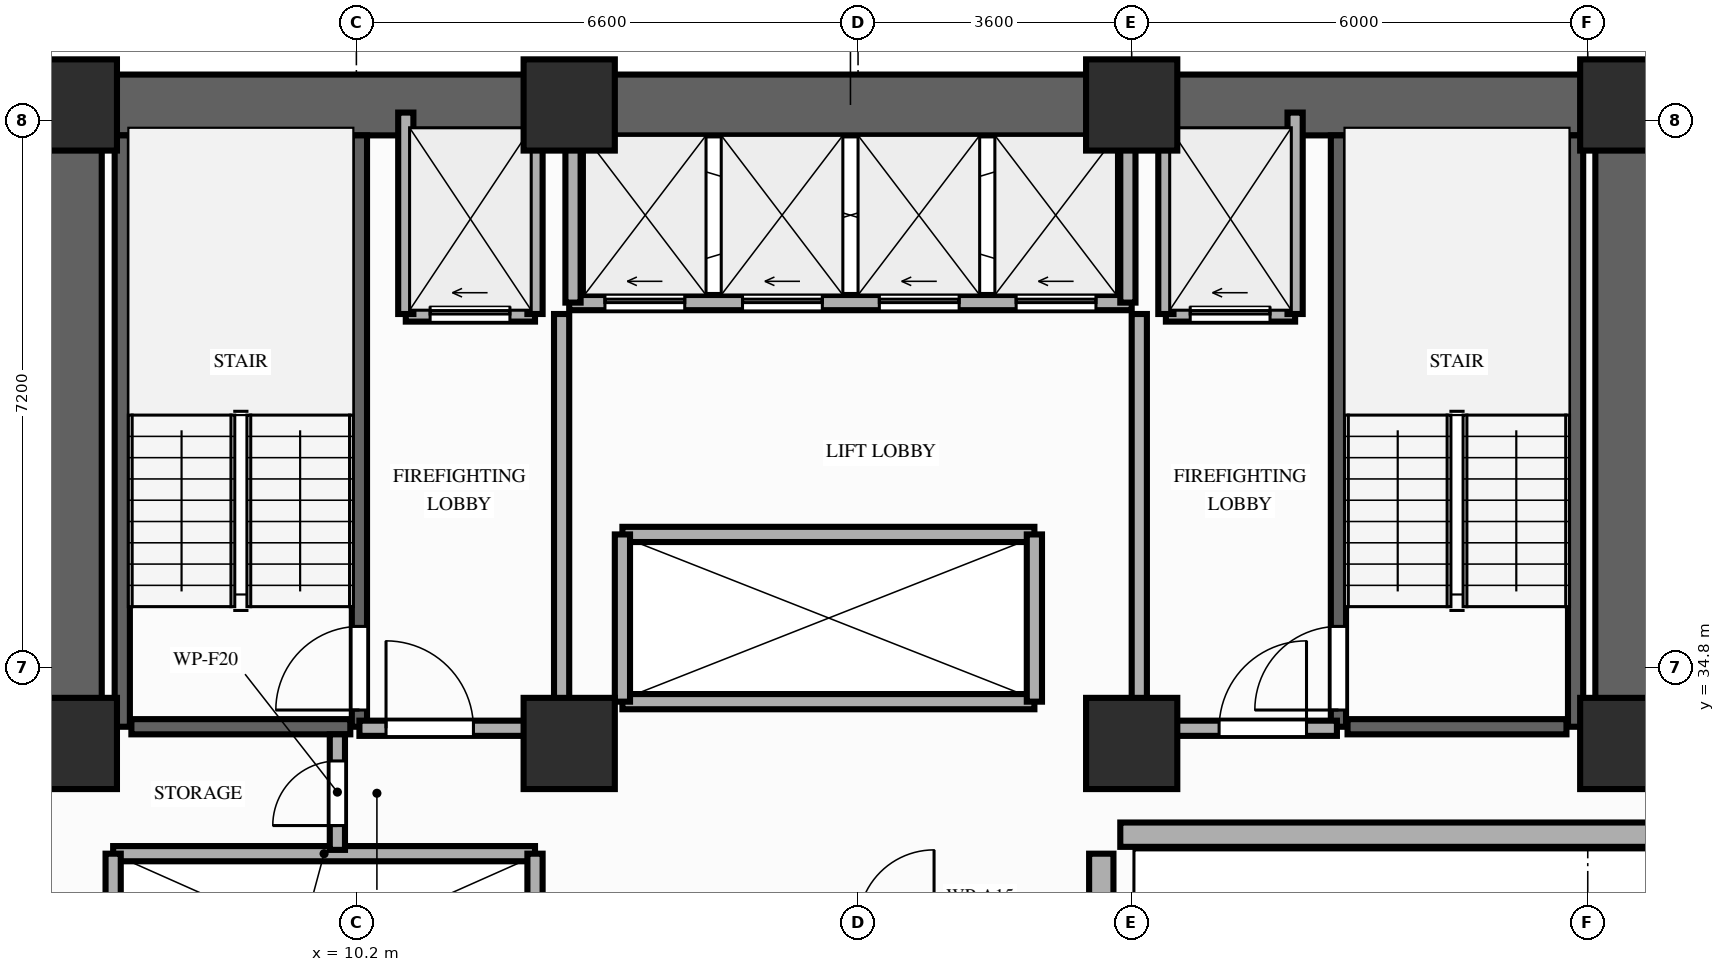
"""IFC4 building model, lengths in metres.
Left out: names, types, materials, properties, quantities, classifications, styles, units other than length and angle.
Written with IfcOpenShell. Run it as: python <this file> out.ifc"""

import sys

from ifc_helpers import new_model, si_unit, direction, frame, frame_2d, origin, origin_2d, place, context, subcontext, project, spatial, rectangle, extrude, element, fill, save


model = new_model("IFC4")
c1 = context("Model", 3, precision=1e-05, world=origin(), true_north=direction((0.0, 1.0)))
c2 = subcontext(c1, "Body", "Model", "MODEL_VIEW")
j1 = project(units=[si_unit("LENGTHUNIT", "METRE"), si_unit("PLANEANGLEUNIT", "RADIAN")], contexts=[c1])
p1 = place(None, origin())
s1 = spatial("IfcSite", under=j1, at=p1, CompositionType="ELEMENT")
p2 = place(p1, origin())
s2 = spatial("IfcBuilding", under=s1, at=p2, CompositionType="ELEMENT")
p3 = place(p2, frame((0.0, 0.0, 36.6)))
s3 = spatial("IfcBuildingStorey", under=s2, at=p3, CompositionType="ELEMENT", Elevation=36.6)
for number, where, z_axis, x_axis in (
    (1, (6.45, 33.8, 0.0), (0.0, 0.0, 1.0), (1.0, 0.0, 0.0)),
    (2, (13.0, 33.8, 0.0), (0.0, 0.0, 1.0), (1.0, 0.0, 0.0)),
    (3, (20.4, 33.8, 0.0), (0.0, 0.0, 1.0), (1.0, 0.0, 0.0)),
    (4, (26.9, 33.8, 0.0), (0.0, 0.0, 1.0), (1.0, 0.0, 0.0)),
    (5, (6.45, 42.2, 0.0), (0.0, 0.0, 1.0), (1.0, 0.0, 0.0)),
    (6, (13.0, 42.2, 0.0), (0.0, 0.0, 1.0), (1.0, 0.0, 0.0)),
    (7, (20.4, 42.2, 0.0), (0.0, 0.0, 1.0), (1.0, 0.0, 0.0)),
    (8, (26.9, 42.2, 0.0), (0.0, 0.0, 1.0), (1.0, 0.0, 0.0)),
):
    element("IfcColumn", number, at=place(p3, frame(where, z_axis=z_axis, x_axis=x_axis)), inside=s3, PredefinedType="COLUMN", context=c2, shape_type="SweptSolid", body=[
        extrude(rectangle(XDim=1.2, YDim=1.2, at=origin_2d()), origin(), (0.0, 0.0, 1.0), 3.2),
    ])
p4 = place(p3, frame((20.0, 8.8, 0.0), z_axis=(0.0, 0.0, 1.0), x_axis=(0.0, 1.0, 0.0)))
e9 = element("IfcWall", 9, at=p4, inside=s3, PredefinedType="STANDARD", context=c2, shape_type="SweptSolid", body=[
    extrude(rectangle(XDim=23.55, YDim=0.32, at=frame_2d((11.775, 0.0))), origin(), (0.0, 0.0, 1.0), 2.35),
])
p5 = place(p4, frame((10.7, 0.0, 0.85)))
e10 = element("IfcOpeningElement", 10, at=p5, cuts=e9, PredefinedType="OPENING", context=c2, shape_type="SweptSolid", body=[
    extrude(rectangle(XDim=2.4, YDim=1.25, at=frame_2d((1.2, 0.625))), frame((0.0, 0.17, 0.0), z_axis=(0.0, -1.0, 0.0), x_axis=(1.0, 0.0, 0.0)), (0.0, 0.0, 1.0), 0.34),
])
p6 = place(p3, frame((20.25, 32.6, 0.0), z_axis=(0.0, 0.0, 1.0), x_axis=(1.0, 0.0, 0.0)))
e11 = element("IfcWall", 11, at=p6, inside=s3, PredefinedType="STANDARD", context=c2, shape_type="SweptSolid", body=[
    extrude(rectangle(XDim=7.35, YDim=0.32, at=frame_2d((3.675, 0.0))), origin(), (0.0, 0.0, 1.0), 2.35),
])
p7 = place(p3, frame((6.45, 42.2, 0.0), z_axis=(0.0, 0.0, 1.0), x_axis=(1.0, 0.0, 0.0)))
e12 = element("IfcWall", 12, at=p7, inside=s3, PredefinedType="SHEAR", context=c2, shape_type="SweptSolid", body=[
    extrude(rectangle(XDim=20.45, YDim=0.8, at=frame_2d((10.225, 0.0))), origin(), (0.0, 0.0, 1.0), 2.96),
])
for number, where, z_axis, x_axis in (
    (13, (6.45, 33.8, 0.0), (0.0, 0.0, 1.0), (0.0, 1.0, 0.0)),
    (14, (26.9, 33.8, 0.0), (0.0, 0.0, 1.0), (0.0, 1.0, 0.0)),
):
    element("IfcWall", number, at=place(p3, frame(where, z_axis=z_axis, x_axis=x_axis)), inside=s3, PredefinedType="SHEAR", context=c2, shape_type="SweptSolid", body=[
        extrude(rectangle(XDim=7.95, YDim=0.8, at=frame_2d((3.975, 0.0))), origin(), (0.0, 0.0, 1.0), 2.96),
    ])
p8 = place(p3, frame((7.12, 34.02, 0.0), z_axis=(0.0, 0.0, 1.0), x_axis=(0.0, 1.0, 0.0)))
e15 = element("IfcWall", 15, at=p8, inside=s3, PredefinedType="SHEAR", context=c2, shape_type="SweptSolid", body=[
    extrude(rectangle(XDim=7.78, YDim=0.2, at=frame_2d((3.89, 0.0))), origin(), (0.0, 0.0, 1.0), 2.96),
])
p9 = place(p3, frame((10.24, 34.02, 0.0), z_axis=(0.0, 0.0, 1.0), x_axis=(0.0, 1.0, 0.0)))
e16 = element("IfcWall", 16, at=p9, inside=s3, PredefinedType="SHEAR", context=c2, shape_type="SweptSolid", body=[
    extrude(rectangle(XDim=7.78, YDim=0.2, at=frame_2d((3.89, 0.0))), origin(), (0.0, 0.0, 1.0), 2.96),
])
p10 = place(p9, frame((0.22, 0.0, 0.0)))
e17 = element("IfcOpeningElement", 17, at=p10, cuts=e16, PredefinedType="OPENING", context=c2, shape_type="SweptSolid", body=[
    extrude(rectangle(XDim=1.1, YDim=2.15, at=frame_2d((0.55, 1.075))), frame((0.0, 0.11, 0.0), z_axis=(0.0, -1.0, 0.0), x_axis=(1.0, 0.0, 0.0)), (0.0, 0.0, 1.0), 0.22),
])
p11 = place(p3, frame((7.24, 34.02, 0.0), z_axis=(0.0, 0.0, 1.0), x_axis=(1.0, 0.0, 0.0)))
e18 = element("IfcWall", 18, at=p11, inside=s3, PredefinedType="SHEAR", context=c2, shape_type="SweptSolid", body=[
    extrude(rectangle(XDim=2.88, YDim=0.2, at=frame_2d((1.44, 0.0))), origin(), (0.0, 0.0, 1.0), 2.96),
])
p12 = place(p3, frame((23.12, 34.02, 0.0), z_axis=(0.0, 0.0, 1.0), x_axis=(0.0, 1.0, 0.0)))
e19 = element("IfcWall", 19, at=p12, inside=s3, PredefinedType="SHEAR", context=c2, shape_type="SweptSolid", body=[
    extrude(rectangle(XDim=7.78, YDim=0.2, at=frame_2d((3.89, 0.0))), origin(), (0.0, 0.0, 1.0), 2.96),
])
p13 = place(p12, frame((0.22, 0.0, 0.0)))
e20 = element("IfcOpeningElement", 20, at=p13, cuts=e19, PredefinedType="OPENING", context=c2, shape_type="SweptSolid", body=[
    extrude(rectangle(XDim=1.1, YDim=2.15, at=frame_2d((0.55, 1.075))), frame((0.0, 0.11, 0.0), z_axis=(0.0, -1.0, 0.0), x_axis=(1.0, 0.0, 0.0)), (0.0, 0.0, 1.0), 0.22),
])
p14 = place(p3, frame((26.24, 34.02, 0.0), z_axis=(0.0, 0.0, 1.0), x_axis=(0.0, 1.0, 0.0)))
e21 = element("IfcWall", 21, at=p14, inside=s3, PredefinedType="SHEAR", context=c2, shape_type="SweptSolid", body=[
    extrude(rectangle(XDim=7.78, YDim=0.2, at=frame_2d((3.89, 0.0))), origin(), (0.0, 0.0, 1.0), 2.96),
])
p15 = place(p3, frame((23.24, 34.02, 0.0), z_axis=(0.0, 0.0, 1.0), x_axis=(1.0, 0.0, 0.0)))
e22 = element("IfcWall", 22, at=p15, inside=s3, PredefinedType="SHEAR", context=c2, shape_type="SweptSolid", body=[
    extrude(rectangle(XDim=2.88, YDim=0.2, at=frame_2d((1.44, 0.0))), origin(), (0.0, 0.0, 1.0), 2.96),
])
p16 = place(p3, frame((7.0, 32.35, 0.0), z_axis=(0.0, 0.0, 1.0), x_axis=(1.0, 0.0, 0.0)))
e23 = element("IfcWall", 23, at=p16, inside=s3, PredefinedType="MOVABLE", context=c2, shape_type="SweptSolid", body=[
    extrude(rectangle(XDim=5.55, YDim=0.2, at=frame_2d((2.775, 0.0))), origin(), (0.0, 0.0, 1.0), 2.96),
])
for number, where, z_axis, x_axis in (
    (24, (7.0, 29.85, 0.0), (0.0, 0.0, 1.0), (0.0, 1.0, 0.0)),
    (25, (12.55, 29.85, 0.0), (0.0, 0.0, 1.0), (0.0, 1.0, 0.0)),
):
    element("IfcWall", number, at=place(p3, frame(where, z_axis=z_axis, x_axis=x_axis)), inside=s3, PredefinedType="MOVABLE", context=c2, shape_type="SweptSolid", body=[
        extrude(rectangle(XDim=2.5, YDim=0.2, at=frame_2d((1.25, 0.0))), origin(), (0.0, 0.0, 1.0), 2.96),
    ])
p17 = place(p3, frame((10.85, 39.45, 0.0), z_axis=(0.0, 0.0, 1.0), x_axis=(1.0, 0.0, 0.0)))
e26 = element("IfcWall", 26, at=p17, inside=s3, PredefinedType="MOVABLE", context=c2, shape_type="SweptSolid", body=[
    extrude(rectangle(XDim=1.7, YDim=0.2, at=frame_2d((0.85, 0.0))), origin(), (0.0, 0.0, 1.0), 2.96),
])
p18 = place(p17, frame((0.32, 0.0, 0.0)))
e27 = element("IfcOpeningElement", 27, at=p18, cuts=e26, PredefinedType="OPENING", context=c2, shape_type="SweptSolid", body=[
    extrude(rectangle(XDim=1.05, YDim=2.15, at=frame_2d((0.525, 1.075))), frame((0.0, 0.11, 0.0), z_axis=(0.0, -1.0, 0.0), x_axis=(1.0, 0.0, 0.0)), (0.0, 0.0, 1.0), 0.22),
])
p19 = place(p3, frame((20.85, 39.45, 0.0), z_axis=(0.0, 0.0, 1.0), x_axis=(1.0, 0.0, 0.0)))
e28 = element("IfcWall", 28, at=p19, inside=s3, PredefinedType="MOVABLE", context=c2, shape_type="SweptSolid", body=[
    extrude(rectangle(XDim=1.7, YDim=0.2, at=frame_2d((0.85, 0.0))), origin(), (0.0, 0.0, 1.0), 2.96),
])
p20 = place(p19, frame((0.32, 0.0, 0.0)))
e29 = element("IfcOpeningElement", 29, at=p20, cuts=e28, PredefinedType="OPENING", context=c2, shape_type="SweptSolid", body=[
    extrude(rectangle(XDim=1.05, YDim=2.15, at=frame_2d((0.525, 1.075))), frame((0.0, 0.11, 0.0), z_axis=(0.0, -1.0, 0.0), x_axis=(1.0, 0.0, 0.0)), (0.0, 0.0, 1.0), 0.22),
])
for number, where, z_axis, x_axis in (
    (30, (10.85, 39.45, 0.0), (0.0, 0.0, 1.0), (0.0, 1.0, 0.0)),
    (31, (12.55, 39.45, 0.0), (0.0, 0.0, 1.0), (0.0, 1.0, 0.0)),
):
    element("IfcWall", number, at=place(p3, frame(where, z_axis=z_axis, x_axis=x_axis)), inside=s3, PredefinedType="MOVABLE", context=c2, shape_type="SweptSolid", body=[
        extrude(rectangle(XDim=2.65, YDim=0.2, at=frame_2d((1.325, 0.0))), origin(), (0.0, 0.0, 1.0), 2.35),
    ])
p21 = place(p3, frame((12.9, 34.0, 0.0), z_axis=(0.0, 0.0, 1.0), x_axis=(0.0, 1.0, 0.0)))
e32 = element("IfcWall", 32, at=p21, inside=s3, PredefinedType="PARTITIONING", context=c2, shape_type="SweptSolid", body=[
    extrude(rectangle(XDim=5.45, YDim=0.2, at=frame_2d((2.725, 0.0))), origin(), (0.0, 0.0, 1.0), 2.35),
])
p22 = place(p3, frame((10.24, 34.0, 0.0), z_axis=(0.0, 0.0, 1.0), x_axis=(1.0, 0.0, 0.0)))
e33 = element("IfcWall", 33, at=p22, inside=s3, PredefinedType="PARTITIONING", context=c2, shape_type="SweptSolid", body=[
    extrude(rectangle(XDim=2.66, YDim=0.2, at=frame_2d((1.33, 0.0))), origin(), (0.0, 0.0, 1.0), 2.35),
])
p23 = place(p22, frame((0.35, 0.0, 0.0)))
e34 = element("IfcOpeningElement", 34, at=p23, cuts=e33, PredefinedType="OPENING", context=c2, shape_type="SweptSolid", body=[
    extrude(rectangle(XDim=1.15, YDim=2.15, at=frame_2d((0.575, 1.075))), frame((0.0, 0.11, 0.0), z_axis=(0.0, -1.0, 0.0), x_axis=(1.0, 0.0, 0.0)), (0.0, 0.0, 1.0), 0.22),
])
for number, where, z_axis, x_axis in (
    (35, (20.85, 39.45, 0.0), (0.0, 0.0, 1.0), (0.0, 1.0, 0.0)),
    (36, (22.55, 39.45, 0.0), (0.0, 0.0, 1.0), (0.0, 1.0, 0.0)),
):
    element("IfcWall", number, at=place(p3, frame(where, z_axis=z_axis, x_axis=x_axis)), inside=s3, PredefinedType="MOVABLE", context=c2, shape_type="SweptSolid", body=[
        extrude(rectangle(XDim=2.65, YDim=0.2, at=frame_2d((1.325, 0.0))), origin(), (0.0, 0.0, 1.0), 2.35),
    ])
p24 = place(p3, frame((20.5, 34.0, 0.0), z_axis=(0.0, 0.0, 1.0), x_axis=(0.0, 1.0, 0.0)))
e37 = element("IfcWall", 37, at=p24, inside=s3, PredefinedType="PARTITIONING", context=c2, shape_type="SweptSolid", body=[
    extrude(rectangle(XDim=5.45, YDim=0.2, at=frame_2d((2.725, 0.0))), origin(), (0.0, 0.0, 1.0), 2.35),
])
p25 = place(p3, frame((20.5, 34.0, 0.0), z_axis=(0.0, 0.0, 1.0), x_axis=(1.0, 0.0, 0.0)))
e38 = element("IfcWall", 38, at=p25, inside=s3, PredefinedType="PARTITIONING", context=c2, shape_type="SweptSolid", body=[
    extrude(rectangle(XDim=2.6, YDim=0.2, at=frame_2d((1.3, 0.0))), origin(), (0.0, 0.0, 1.0), 2.35),
])
p26 = place(p25, frame((1.05, 0.0, 0.0)))
e39 = element("IfcOpeningElement", 39, at=p26, cuts=e38, PredefinedType="OPENING", context=c2, shape_type="SweptSolid", body=[
    extrude(rectangle(XDim=1.15, YDim=2.15, at=frame_2d((0.575, 1.075))), frame((0.0, 0.11, 0.0), z_axis=(0.0, -1.0, 0.0), x_axis=(1.0, 0.0, 0.0)), (0.0, 0.0, 1.0), 0.22),
])
p27 = place(p3, frame((9.95, 32.4, 0.0), z_axis=(0.0, 0.0, 1.0), x_axis=(0.0, 1.0, 0.0)))
e40 = element("IfcWall", 40, at=p27, inside=s3, PredefinedType="PARTITIONING", context=c2, shape_type="SweptSolid", body=[
    extrude(rectangle(XDim=1.52, YDim=0.2, at=frame_2d((0.76, 0.0))), origin(), (0.0, 0.0, 1.0), 2.35),
])
p28 = place(p27, frame((0.32, 0.0, 0.0)))
e41 = element("IfcOpeningElement", 41, at=p28, cuts=e40, PredefinedType="OPENING", context=c2, shape_type="SweptSolid", body=[
    extrude(rectangle(XDim=0.85, YDim=2.05, at=frame_2d((0.425, 1.025))), frame((0.0, 0.11, 0.0), z_axis=(0.0, -1.0, 0.0), x_axis=(1.0, 0.0, 0.0)), (0.0, 0.0, 1.0), 0.22),
])
p29 = place(p3, frame((13.0, 39.6, 0.0), z_axis=(0.0, 0.0, 1.0), x_axis=(1.0, 0.0, 0.0)))
e42 = element("IfcWall", 42, at=p29, inside=s3, PredefinedType="MOVABLE", context=c2, shape_type="SweptSolid", body=[
    extrude(rectangle(XDim=7.4, YDim=0.2, at=frame_2d((3.7, 0.0))), origin(), (0.0, 0.0, 1.0), 2.96),
])
p30 = place(p29, frame((0.47, 0.0, 0.0)))
e43 = element("IfcOpeningElement", 43, at=p30, cuts=e42, PredefinedType="OPENING", context=c2, shape_type="SweptSolid", body=[
    extrude(rectangle(XDim=1.05, YDim=2.15, at=frame_2d((0.525, 1.075))), frame((0.0, 0.11, 0.0), z_axis=(0.0, -1.0, 0.0), x_axis=(1.0, 0.0, 0.0)), (0.0, 0.0, 1.0), 0.22),
])
p31 = place(p29, frame((2.28, 0.0, 0.0)))
e44 = element("IfcOpeningElement", 44, at=p31, cuts=e42, PredefinedType="OPENING", context=c2, shape_type="SweptSolid", body=[
    extrude(rectangle(XDim=1.05, YDim=2.15, at=frame_2d((0.525, 1.075))), frame((0.0, 0.11, 0.0), z_axis=(0.0, -1.0, 0.0), x_axis=(1.0, 0.0, 0.0)), (0.0, 0.0, 1.0), 0.22),
])
p32 = place(p29, frame((4.08, 0.0, 0.0)))
e45 = element("IfcOpeningElement", 45, at=p32, cuts=e42, PredefinedType="OPENING", context=c2, shape_type="SweptSolid", body=[
    extrude(rectangle(XDim=1.05, YDim=2.15, at=frame_2d((0.525, 1.075))), frame((0.0, 0.11, 0.0), z_axis=(0.0, -1.0, 0.0), x_axis=(1.0, 0.0, 0.0)), (0.0, 0.0, 1.0), 0.22),
])
p33 = place(p29, frame((5.88, 0.0, 0.0)))
e46 = element("IfcOpeningElement", 46, at=p33, cuts=e42, PredefinedType="OPENING", context=c2, shape_type="SweptSolid", body=[
    extrude(rectangle(XDim=1.05, YDim=2.15, at=frame_2d((0.525, 1.075))), frame((0.0, 0.11, 0.0), z_axis=(0.0, -1.0, 0.0), x_axis=(1.0, 0.0, 0.0)), (0.0, 0.0, 1.0), 0.22),
])
for number, where, z_axis, x_axis in (
    (47, (13.05, 39.6, 0.0), (0.0, 0.0, 1.0), (0.0, 1.0, 0.0)),
    (48, (20.35, 39.6, 0.0), (0.0, 0.0, 1.0), (0.0, 1.0, 0.0)),
):
    element("IfcWall", number, at=place(p3, frame(where, z_axis=z_axis, x_axis=x_axis)), inside=s3, PredefinedType="MOVABLE", context=c2, shape_type="SweptSolid", body=[
        extrude(rectangle(XDim=2.18, YDim=0.2, at=frame_2d((1.09, 0.0))), origin(), (0.0, 0.0, 1.0), 2.96),
    ])
for number, where, z_axis, x_axis in (
    (49, (13.7, 34.35, 0.0), (0.0, 0.0, 1.0), (1.0, 0.0, 0.0)),
    (50, (13.7, 36.55, 0.0), (0.0, 0.0, 1.0), (1.0, 0.0, 0.0)),
):
    element("IfcWall", number, at=place(p3, frame(where, z_axis=z_axis, x_axis=x_axis)), inside=s3, PredefinedType="MOVABLE", context=c2, shape_type="SweptSolid", body=[
        extrude(rectangle(XDim=5.42, YDim=0.2, at=frame_2d((2.71, 0.0))), origin(), (0.0, 0.0, 1.0), 2.96),
    ])
for number, where, z_axis, x_axis in (
    (51, (13.7, 34.35, 0.0), (0.0, 0.0, 1.0), (0.0, 1.0, 0.0)),
    (52, (19.12, 34.35, 0.0), (0.0, 0.0, 1.0), (0.0, 1.0, 0.0)),
):
    element("IfcWall", number, at=place(p3, frame(where, z_axis=z_axis, x_axis=x_axis)), inside=s3, PredefinedType="MOVABLE", context=c2, shape_type="SweptSolid", body=[
        extrude(rectangle(XDim=2.2, YDim=0.2, at=frame_2d((1.1, 0.0))), origin(), (0.0, 0.0, 1.0), 2.96),
    ])
p34 = place(p10, origin())
e53 = element("IfcDoor", 53, at=p34, inside=s3, OperationType="SINGLE_SWING_LEFT", PredefinedType="DOOR", context=c2, shape_type="SweptSolid", body=[
    extrude(rectangle(XDim=1.1, YDim=2.15, at=frame_2d((0.55, 1.075))), frame((0.0, 0.025, 0.0), z_axis=(0.0, -1.0, 0.0), x_axis=(1.0, 0.0, 0.0)), (0.0, 0.0, 1.0), 0.05),
])
fill(e17, e53)
p35 = place(p13, origin())
e54 = element("IfcDoor", 54, at=p35, inside=s3, OperationType="SINGLE_SWING_LEFT", PredefinedType="DOOR", context=c2, shape_type="SweptSolid", body=[
    extrude(rectangle(XDim=1.1, YDim=2.15, at=frame_2d((0.55, 1.075))), frame((0.0, 0.025, 0.0), z_axis=(0.0, -1.0, 0.0), x_axis=(1.0, 0.0, 0.0)), (0.0, 0.0, 1.0), 0.05),
])
fill(e20, e54)
p36 = place(p18, origin())
e55 = element("IfcDoor", 55, at=p36, inside=s3, OperationType="SLIDING_TO_LEFT", PredefinedType="DOOR", context=c2, shape_type="SweptSolid", body=[
    extrude(rectangle(XDim=1.05, YDim=2.15, at=frame_2d((0.525, 1.075))), frame((0.0, 0.025, 0.0), z_axis=(0.0, -1.0, 0.0), x_axis=(1.0, 0.0, 0.0)), (0.0, 0.0, 1.0), 0.05),
])
fill(e27, e55)
p37 = place(p20, origin())
e56 = element("IfcDoor", 56, at=p37, inside=s3, OperationType="SLIDING_TO_LEFT", PredefinedType="DOOR", context=c2, shape_type="SweptSolid", body=[
    extrude(rectangle(XDim=1.05, YDim=2.15, at=frame_2d((0.525, 1.075))), frame((0.0, 0.025, 0.0), z_axis=(0.0, -1.0, 0.0), x_axis=(1.0, 0.0, 0.0)), (0.0, 0.0, 1.0), 0.05),
])
fill(e29, e56)
p38 = place(p23, origin())
e57 = element("IfcDoor", 57, at=p38, inside=s3, OperationType="SINGLE_SWING_LEFT", PredefinedType="DOOR", context=c2, shape_type="SweptSolid", body=[
    extrude(rectangle(XDim=1.15, YDim=2.15, at=frame_2d((0.575, 1.075))), frame((0.0, 0.025, 0.0), z_axis=(0.0, -1.0, 0.0), x_axis=(1.0, 0.0, 0.0)), (0.0, 0.0, 1.0), 0.05),
])
fill(e34, e57)
p39 = place(p26, origin())
e58 = element("IfcDoor", 58, at=p39, inside=s3, OperationType="SINGLE_SWING_RIGHT", PredefinedType="DOOR", context=c2, shape_type="SweptSolid", body=[
    extrude(rectangle(XDim=1.15, YDim=2.15, at=frame_2d((0.575, 1.075))), frame((0.0, 0.025, 0.0), z_axis=(0.0, -1.0, 0.0), x_axis=(1.0, 0.0, 0.0)), (0.0, 0.0, 1.0), 0.05),
])
fill(e39, e58)
p40 = place(p28, origin())
e59 = element("IfcDoor", 59, at=p40, inside=s3, OperationType="SINGLE_SWING_LEFT", PredefinedType="DOOR", context=c2, shape_type="SweptSolid", body=[
    extrude(rectangle(XDim=0.85, YDim=2.05, at=frame_2d((0.425, 1.025))), frame((0.0, 0.025, 0.0), z_axis=(0.0, -1.0, 0.0), x_axis=(1.0, 0.0, 0.0)), (0.0, 0.0, 1.0), 0.05),
])
fill(e41, e59)
p41 = place(p30, origin())
e60 = element("IfcDoor", 60, at=p41, inside=s3, OperationType="SLIDING_TO_LEFT", PredefinedType="DOOR", context=c2, shape_type="SweptSolid", body=[
    extrude(rectangle(XDim=1.05, YDim=2.15, at=frame_2d((0.525, 1.075))), frame((0.0, 0.025, 0.0), z_axis=(0.0, -1.0, 0.0), x_axis=(1.0, 0.0, 0.0)), (0.0, 0.0, 1.0), 0.05),
])
fill(e43, e60)
p42 = place(p31, origin())
e61 = element("IfcDoor", 61, at=p42, inside=s3, OperationType="SLIDING_TO_LEFT", PredefinedType="DOOR", context=c2, shape_type="SweptSolid", body=[
    extrude(rectangle(XDim=1.05, YDim=2.15, at=frame_2d((0.525, 1.075))), frame((0.0, 0.025, 0.0), z_axis=(0.0, -1.0, 0.0), x_axis=(1.0, 0.0, 0.0)), (0.0, 0.0, 1.0), 0.05),
])
fill(e44, e61)
p43 = place(p32, origin())
e62 = element("IfcDoor", 62, at=p43, inside=s3, OperationType="SLIDING_TO_LEFT", PredefinedType="DOOR", context=c2, shape_type="SweptSolid", body=[
    extrude(rectangle(XDim=1.05, YDim=2.15, at=frame_2d((0.525, 1.075))), frame((0.0, 0.025, 0.0), z_axis=(0.0, -1.0, 0.0), x_axis=(1.0, 0.0, 0.0)), (0.0, 0.0, 1.0), 0.05),
])
fill(e45, e62)
p44 = place(p33, origin())
e63 = element("IfcDoor", 63, at=p44, inside=s3, OperationType="SLIDING_TO_LEFT", PredefinedType="DOOR", context=c2, shape_type="SweptSolid", body=[
    extrude(rectangle(XDim=1.05, YDim=2.15, at=frame_2d((0.525, 1.075))), frame((0.0, 0.025, 0.0), z_axis=(0.0, -1.0, 0.0), x_axis=(1.0, 0.0, 0.0)), (0.0, 0.0, 1.0), 0.05),
])
fill(e46, e63)
save(model, sys.argv[1])
